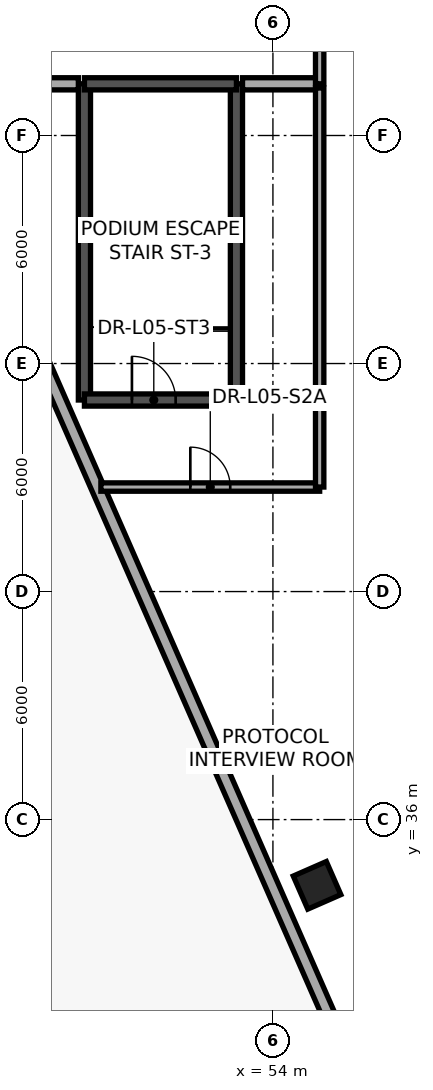
"""IFC4 building model, lengths in metres.
Left out: names, types, materials, properties, quantities, classifications, styles, units other than length and angle.
Written with IfcOpenShell. Run it as: python <this file> out.ifc"""

import sys

from ifc_helpers import new_model, si_unit, direction, frame, frame_2d, origin, origin_2d, place, context, subcontext, project, spatial, rectangle, extrude, element, fill, save


model = new_model("IFC4")
c1 = context("Model", 3, precision=1e-05, world=origin(), true_north=direction((0.0, 1.0)))
c2 = subcontext(c1, "Body", "Model", "MODEL_VIEW")
j1 = project(units=[si_unit("LENGTHUNIT", "METRE"), si_unit("PLANEANGLEUNIT", "RADIAN")], contexts=[c1])
p1 = place(None, origin())
s1 = spatial("IfcSite", under=j1, at=p1, CompositionType="ELEMENT")
p2 = place(p1, origin())
s2 = spatial("IfcBuilding", under=s1, at=p2, CompositionType="ELEMENT")
p3 = place(p2, frame((0.0, 0.0, 22.8)))
s3 = spatial("IfcBuildingStorey", under=s2, at=p3, CompositionType="ELEMENT", Elevation=22.8)
for number, where, z_axis, x_axis in (
    (1, (49.04, 47.04, 0.0), (0.0, 0.0, 1.0), (0.0, 1.0, 0.0)),
    (2, (53.04, 47.04, 0.0), (0.0, 0.0, 1.0), (0.0, 1.0, 0.0)),
):
    element("IfcWall", number, at=place(p3, frame(where, z_axis=z_axis, x_axis=x_axis)), inside=s3, PredefinedType="SHEAR", context=c2, shape_type="SweptSolid", body=[
        extrude(rectangle(XDim=8.32, YDim=0.32, at=frame_2d((4.16, 0.0))), origin(), (0.0, 0.0, 1.0), 3.375),
    ])
p4 = place(p3, frame((49.04, 55.36, 0.0), z_axis=(0.0, 0.0, 1.0), x_axis=(1.0, 0.0, 0.0)))
e3 = element("IfcWall", 3, at=p4, inside=s3, PredefinedType="SHEAR", context=c2, shape_type="SweptSolid", body=[
    extrude(rectangle(XDim=4.0, YDim=0.32, at=frame_2d((2.0, 0.0))), origin(), (0.0, 0.0, 1.0), 3.375),
])
p5 = place(p3, frame((49.04, 47.04, 0.0), z_axis=(0.0, 0.0, 1.0), x_axis=(1.0, 0.0, 0.0)))
e4 = element("IfcWall", 4, at=p5, inside=s3, PredefinedType="SHEAR", context=c2, shape_type="SweptSolid", body=[
    extrude(rectangle(XDim=4.0, YDim=0.32, at=frame_2d((2.0, 0.0))), origin(), (0.0, 0.0, 1.0), 3.375),
])
p6 = place(p5, frame((1.25, 0.0, 0.0)))
e5 = element("IfcOpeningElement", 5, at=p6, cuts=e4, PredefinedType="OPENING", context=c2, shape_type="SweptSolid", body=[
    extrude(rectangle(XDim=1.15, YDim=2.15, at=frame_2d((0.575, 1.075))), frame((0.0, 0.17, 0.0), z_axis=(0.0, -1.0, 0.0), x_axis=(1.0, 0.0, 0.0)), (0.0, 0.0, 1.0), 0.34),
])
p7 = place(p3, frame((55.139, 34.171, 0.003), z_axis=(0.012375141264, 0.054450621561, 0.998439775695), x_axis=(-0.188739142008, 0.980694587215, -0.051143551703)))
e6 = element("IfcColumn", 6, at=p7, inside=s3, PredefinedType="COLUMN", context=c2, shape_type="SweptSolid", body=[
    extrude(rectangle(XDim=0.95, YDim=0.95, at=origin_2d()), origin(), (0.0, 0.0, 1.0), 3.65),
])
p8 = place(p3, frame((61.237, 17.689, 0.0), z_axis=(0.0, 0.0, 1.0), x_axis=(-0.401346447851, 0.9159263228, 0.0)))
e7 = element("IfcWall", 7, at=p8, inside=s3, PredefinedType="STANDARD", context=c2, shape_type="SweptSolid", body=[
    extrude(rectangle(XDim=50.047, YDim=0.34, at=frame_2d((25.023, 0.0))), origin(), (0.0, 0.0, 1.0), 0.85),
])
p9 = place(p3, frame((49.472, 44.75, 0.0), z_axis=(0.0, 0.0, 1.0), x_axis=(1.0, 0.0, 0.0)))
e8 = element("IfcWall", 8, at=p9, inside=s3, PredefinedType="PARTITIONING", context=c2, shape_type="SweptSolid", body=[
    extrude(rectangle(XDim=5.758, YDim=0.22, at=frame_2d((2.879, 0.0))), origin(), (0.0, 0.0, 1.0), 2.505),
])
p10 = place(p9, frame((2.354, 0.0, 0.0)))
e9 = element("IfcOpeningElement", 9, at=p10, cuts=e8, PredefinedType="OPENING", context=c2, shape_type="SweptSolid", body=[
    extrude(rectangle(XDim=1.05, YDim=2.15, at=frame_2d((0.525, 1.075))), frame((0.0, 0.12, 0.0), z_axis=(0.0, -1.0, 0.0), x_axis=(1.0, 0.0, 0.0)), (0.0, 0.0, 1.0), 0.24),
])
p11 = place(p3, frame((44.823, 55.36, 0.0), z_axis=(0.0, 0.0, 1.0), x_axis=(1.0, 0.0, 0.0)))
e10 = element("IfcWall", 10, at=p11, inside=s3, PredefinedType="STANDARD", context=c2, shape_type="SweptSolid", body=[
    extrude(rectangle(XDim=4.057, YDim=0.32, at=frame_2d((2.028, 0.0))), origin(), (0.0, 0.0, 1.0), 2.505),
])
p12 = place(p3, frame((53.2, 55.36, 0.0), z_axis=(0.0, 0.0, 1.0), x_axis=(1.0, 0.0, 0.0)))
e11 = element("IfcWall", 11, at=p12, inside=s3, PredefinedType="STANDARD", context=c2, shape_type="SweptSolid", body=[
    extrude(rectangle(XDim=2.03, YDim=0.32, at=frame_2d((1.015, 0.0))), origin(), (0.0, 0.0, 1.0), 2.755),
])
p13 = place(p3, frame((55.23, 44.75, 0.0), z_axis=(0.0, 0.0, 1.0), x_axis=(0.0, 1.0, 0.0)))
e12 = element("IfcWall", 12, at=p13, inside=s3, PredefinedType="PARTITIONING", context=c2, shape_type="SweptSolid", body=[
    extrude(rectangle(XDim=10.5, YDim=0.22, at=frame_2d((5.25, 0.0))), origin(), (0.0, 0.0, 1.0), 2.755),
])
p14 = place(p3, frame((55.23, 55.36, 0.0), z_axis=(0.0, 0.0, 1.0), x_axis=(0.0, 1.0, 0.0)))
e13 = element("IfcWall", 13, at=p14, inside=s3, PredefinedType="PARTITIONING", context=c2, shape_type="SweptSolid", body=[
    extrude(rectangle(XDim=21.31, YDim=0.22, at=frame_2d((10.655, 0.0))), origin(), (0.0, 0.0, 1.0), 2.555),
])
p15 = place(p14, frame((10.155, 0.0, 0.0)))
e14 = element("IfcOpeningElement", 14, at=p15, cuts=e13, PredefinedType="OPENING", context=c2, shape_type="SweptSolid", body=[
    extrude(rectangle(XDim=1.0, YDim=2.1, at=frame_2d((0.5, 1.05))), frame((0.0, 0.12, 0.0), z_axis=(0.0, -1.0, 0.0), x_axis=(1.0, 0.0, 0.0)), (0.0, 0.0, 1.0), 0.24),
])
p16 = place(p6, origin())
e15 = element("IfcDoor", 15, at=p16, inside=s3, OperationType="SINGLE_SWING_LEFT", PredefinedType="DOOR", context=c2, shape_type="SweptSolid", body=[
    extrude(rectangle(XDim=1.15, YDim=2.15, at=frame_2d((0.575, 1.075))), frame((0.0, 0.025, 0.0), z_axis=(0.0, -1.0, 0.0), x_axis=(1.0, 0.0, 0.0)), (0.0, 0.0, 1.0), 0.05),
])
fill(e5, e15)
p17 = place(p10, origin())
e16 = element("IfcDoor", 16, at=p17, inside=s3, OperationType="SINGLE_SWING_LEFT", PredefinedType="DOOR", context=c2, shape_type="SweptSolid", body=[
    extrude(rectangle(XDim=1.05, YDim=2.15, at=frame_2d((0.525, 1.075))), frame((0.0, 0.025, 0.0), z_axis=(0.0, -1.0, 0.0), x_axis=(1.0, 0.0, 0.0)), (0.0, 0.0, 1.0), 0.05),
])
fill(e9, e16)
save(model, sys.argv[1])
